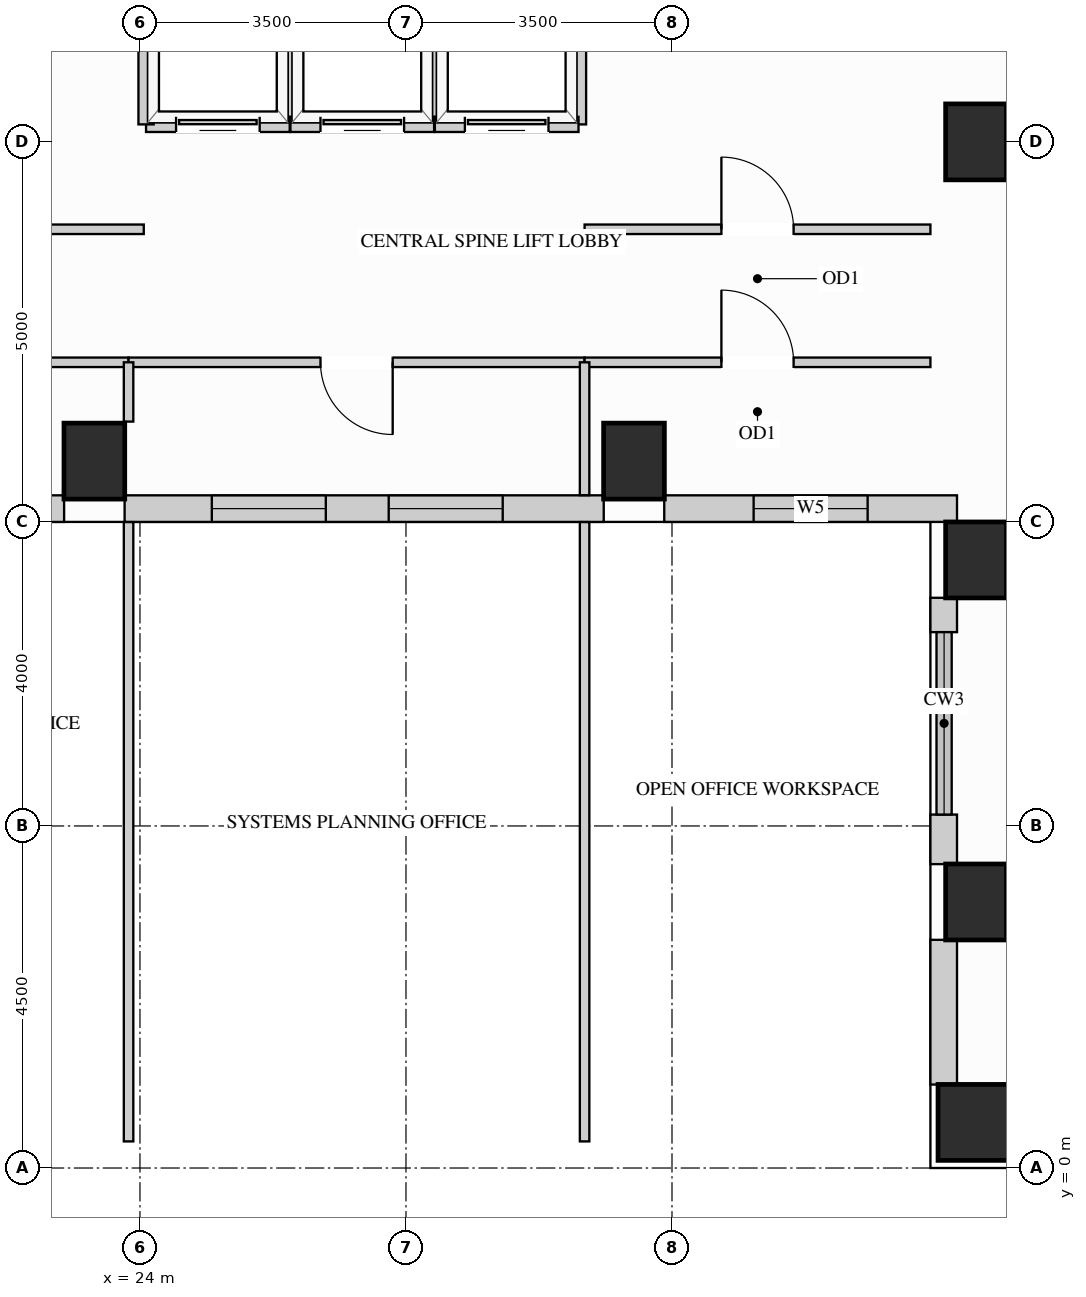
"""IFC4 building model, lengths in metres.
Left out: names, types, materials, properties, quantities, classifications, styles, units other than length and angle.
Written with IfcOpenShell. Run it as: python <this file> out.ifc"""

import sys

from ifc_helpers import new_model, si_unit, direction, frame, frame_2d, origin, origin_2d, place, context, subcontext, project, spatial, rectangle, extrude, source, transform, mapped, element, fill, save


model = new_model("IFC4")
c1 = context("Model", 3, precision=1e-05, world=origin(), true_north=direction((0.0, 1.0)))
c2 = subcontext(c1, "Body", "Model", "MODEL_VIEW")
j1 = project(units=[si_unit("LENGTHUNIT", "METRE"), si_unit("PLANEANGLEUNIT", "RADIAN")], contexts=[c1])
p1 = place(None, origin())
s1 = spatial("IfcSite", under=j1, at=p1, CompositionType="ELEMENT")
p2 = place(p1, origin())
s2 = spatial("IfcBuilding", under=s1, at=p2, CompositionType="ELEMENT")
p3 = place(p2, frame((0.0, 0.0, 189.9)))
s3 = spatial("IfcBuildingStorey", under=s2, at=p3, CompositionType="ELEMENT", Elevation=189.9)
m1 = source(origin(), c2, "Body", "SweptSolid", [
    extrude(rectangle(XDim=0.8, YDim=1.0, at=origin_2d()), origin(), (0.0, 0.0, 1.0), 3.4),
])
for number, where, z_axis, x_axis in (
    (1, (35.0, 13.5, 0.0), (0.0, 0.0, 1.0), (1.0, 0.0, 0.0)),
    (2, (35.0, 3.5, 0.0), (0.0, 0.0, 1.0), (1.0, 0.0, 0.0)),
    (3, (35.0, 8.0, 0.0), (0.0, 0.0, 1.0), (1.0, 0.0, 0.0)),
    (4, (23.4, 9.3, 0.0), (0.0, 0.0, 1.0), (1.0, 0.0, 0.0)),
    (5, (30.5, 9.3, 0.0), (0.0, 0.0, 1.0), (1.0, 0.0, 0.0)),
):
    element("IfcColumn", number, at=place(p3, frame(where, z_axis=z_axis, x_axis=x_axis)), inside=s3, PredefinedType="COLUMN", context=c2, shape_type="MappedRepresentation", body=[
        mapped(m1, transform((0.0, 0.0, 0.0), x_axis=(1.0, 0.0, 0.0), y_axis=(0.0, 1.0, 0.0), z_axis=(0.0, 0.0, 1.0))),
    ])
m2 = source(origin(), c2, "Body", "SweptSolid", [
    extrude(rectangle(XDim=1.0, YDim=1.0, at=origin_2d()), origin(), (0.0, 0.0, 1.0), 3.4),
])
p4 = place(p3, frame((35.0, 0.6, 0.0), z_axis=(0.0, 0.0, 1.0), x_axis=(1.0, 0.0, 0.0)))
e6 = element("IfcColumn", 6, at=p4, inside=s3, PredefinedType="COLUMN", context=c2, shape_type="MappedRepresentation", body=[
    mapped(m2, transform((0.0, 0.0, 0.0), x_axis=(1.0, 0.0, 0.0), y_axis=(0.0, 1.0, 0.0), z_axis=(0.0, 0.0, 1.0))),
])
p5 = place(p3, frame((19.398, 8.675, 0.0), z_axis=(0.0, 0.0, 1.0), x_axis=(1.0, 0.0, 0.0)))
e7 = element("IfcWall", 7, at=p5, inside=s3, PredefinedType="SOLIDWALL", context=c2, shape_type="SweptSolid", body=[
    extrude(rectangle(XDim=3.604, YDim=0.35, at=frame_2d((1.802, 0.0))), origin(), (0.0, 0.0, 1.0), 3.385),
])
p6 = place(p5, frame((1.067, 0.0, 0.78)))
e8 = element("IfcOpeningElement", 8, at=p6, cuts=e7, PredefinedType="OPENING", context=c2, shape_type="SweptSolid", body=[
    extrude(rectangle(XDim=1.5, YDim=2.0, at=frame_2d((0.75, 1.0))), frame((0.0, 0.185, 0.0), z_axis=(0.0, -1.0, 0.0), x_axis=(1.0, 0.0, 0.0)), (0.0, 0.0, 1.0), 0.37),
])
p7 = place(p3, frame((23.798, 8.675, 0.0), z_axis=(0.0, 0.0, 1.0), x_axis=(1.0, 0.0, 0.0)))
e9 = element("IfcWall", 9, at=p7, inside=s3, PredefinedType="SOLIDWALL", context=c2, shape_type="SweptSolid", body=[
    extrude(rectangle(XDim=6.304, YDim=0.35, at=frame_2d((3.152, 0.0))), origin(), (0.0, 0.0, 1.0), 3.385),
])
p8 = place(p7, frame((1.147, 0.0, 0.78)))
e10 = element("IfcOpeningElement", 10, at=p8, cuts=e9, PredefinedType="OPENING", context=c2, shape_type="SweptSolid", body=[
    extrude(rectangle(XDim=1.5, YDim=2.0, at=frame_2d((0.75, 1.0))), frame((0.0, 0.185, 0.0), z_axis=(0.0, -1.0, 0.0), x_axis=(1.0, 0.0, 0.0)), (0.0, 0.0, 1.0), 0.37),
])
p9 = place(p7, frame((3.475, 0.0, 0.78)))
e11 = element("IfcOpeningElement", 11, at=p9, cuts=e9, PredefinedType="OPENING", context=c2, shape_type="SweptSolid", body=[
    extrude(rectangle(XDim=1.5, YDim=2.0, at=frame_2d((0.75, 1.0))), frame((0.0, 0.185, 0.0), z_axis=(0.0, -1.0, 0.0), x_axis=(1.0, 0.0, 0.0)), (0.0, 0.0, 1.0), 0.37),
])
p10 = place(p3, frame((30.898, 8.675, 0.0), z_axis=(0.0, 0.0, 1.0), x_axis=(1.0, 0.0, 0.0)))
e12 = element("IfcWall", 12, at=p10, inside=s3, PredefinedType="SOLIDWALL", context=c2, shape_type="SweptSolid", body=[
    extrude(rectangle(XDim=3.852, YDim=0.35, at=frame_2d((1.926, 0.0))), origin(), (0.0, 0.0, 1.0), 3.385),
])
p11 = place(p10, frame((1.176, 0.0, 0.78)))
e13 = element("IfcOpeningElement", 13, at=p11, cuts=e12, PredefinedType="OPENING", context=c2, shape_type="SweptSolid", body=[
    extrude(rectangle(XDim=1.5, YDim=2.0, at=frame_2d((0.75, 1.0))), frame((0.0, 0.185, 0.0), z_axis=(0.0, -1.0, 0.0), x_axis=(1.0, 0.0, 0.0)), (0.0, 0.0, 1.0), 0.37),
])
m3 = source(origin(), c2, "Body", "SweptSolid", [
    extrude(rectangle(XDim=0.452, YDim=0.35, at=frame_2d((0.226, 0.0))), origin(), (0.0, 0.0, 1.0), 2.612),
])
p12 = place(p3, frame((34.575, 7.502, 0.0), z_axis=(0.0, 0.0, 1.0), x_axis=(0.0, -1.0, 0.0)))
e14 = element("IfcWall", 14, at=p12, inside=s3, PredefinedType="SOLIDWALL", context=c2, shape_type="MappedRepresentation", body=[
    mapped(m3, transform((0.0, 0.0, 0.0), x_axis=(1.0, 0.0, 0.0), y_axis=(0.0, 1.0, 0.0), z_axis=(0.0, 0.0, 1.0))),
])
m4 = source(origin(), c2, "Body", "SweptSolid", [
    extrude(rectangle(XDim=0.652, YDim=0.35, at=frame_2d((0.326, 0.0))), origin(), (0.0, 0.0, 1.0), 2.612),
])
p13 = place(p3, frame((34.575, 4.65, 0.0), z_axis=(0.0, 0.0, 1.0), x_axis=(0.0, -1.0, 0.0)))
e15 = element("IfcWall", 15, at=p13, inside=s3, PredefinedType="SOLIDWALL", context=c2, shape_type="MappedRepresentation", body=[
    mapped(m4, transform((0.0, 0.0, 0.0), x_axis=(1.0, 0.0, 0.0), y_axis=(0.0, 1.0, 0.0), z_axis=(0.0, 0.0, 1.0))),
])
m5 = source(origin(), c2, "Body", "SweptSolid", [
    extrude(rectangle(XDim=1.904, YDim=0.35, at=frame_2d((0.952, 0.0))), origin(), (0.0, 0.0, 1.0), 2.612),
])
p14 = place(p3, frame((34.575, 3.002, 0.0), z_axis=(0.0, 0.0, 1.0), x_axis=(0.0, -1.0, 0.0)))
e16 = element("IfcWall", 16, at=p14, inside=s3, PredefinedType="SOLIDWALL", context=c2, shape_type="MappedRepresentation", body=[
    mapped(m5, transform((0.0, 0.0, 0.0), x_axis=(1.0, 0.0, 0.0), y_axis=(0.0, 1.0, 0.0), z_axis=(0.0, 0.0, 1.0))),
])
p15 = place(p3, frame((29.85, 12.35, 0.0), z_axis=(0.0, 0.0, 1.0), x_axis=(1.0, 0.0, 0.0)))
e17 = element("IfcWall", 17, at=p15, inside=s3, PredefinedType="PARTITIONING", context=c2, shape_type="SweptSolid", body=[
    extrude(rectangle(XDim=4.55, YDim=0.125, at=frame_2d((2.275, 0.0))), origin(), (0.0, 0.0, 1.0), 3.385),
])
p16 = place(p15, frame((1.8, 0.0, 0.0)))
e18 = element("IfcOpeningElement", 18, at=p16, cuts=e17, PredefinedType="OPENING", context=c2, shape_type="SweptSolid", body=[
    extrude(rectangle(XDim=0.95, YDim=2.15, at=frame_2d((0.475, 1.075))), frame((0.0, 0.073, 0.0), z_axis=(0.0, -1.0, 0.0), x_axis=(1.0, 0.0, 0.0)), (0.0, 0.0, 1.0), 0.145),
])
p17 = place(p3, frame((19.5, 12.35, 0.0), z_axis=(0.0, 0.0, 1.0), x_axis=(1.0, 0.0, 0.0)))
e19 = element("IfcWall", 19, at=p17, inside=s3, PredefinedType="PARTITIONING", context=c2, shape_type="SweptSolid", body=[
    extrude(rectangle(XDim=4.55, YDim=0.125, at=frame_2d((2.275, 0.0))), origin(), (0.0, 0.0, 1.0), 3.385),
])
p18 = place(p17, frame((1.8, 0.0, 0.0)))
e20 = element("IfcOpeningElement", 20, at=p18, cuts=e19, PredefinedType="OPENING", context=c2, shape_type="SweptSolid", body=[
    extrude(rectangle(XDim=0.95, YDim=2.15, at=frame_2d((0.475, 1.075))), frame((0.0, 0.073, 0.0), z_axis=(0.0, -1.0, 0.0), x_axis=(1.0, 0.0, 0.0)), (0.0, 0.0, 1.0), 0.145),
])
p19 = place(p3, frame((19.5, 10.6, 0.0), z_axis=(0.0, 0.0, 1.0), x_axis=(1.0, 0.0, 0.0)))
e21 = element("IfcWall", 21, at=p19, inside=s3, PredefinedType="PARTITIONING", context=c2, shape_type="SweptSolid", body=[
    extrude(rectangle(XDim=4.35, YDim=0.125, at=frame_2d((2.175, 0.0))), origin(), (0.0, 0.0, 1.0), 3.385),
])
p20 = place(p19, frame((1.7, 0.0, 0.0)))
e22 = element("IfcOpeningElement", 22, at=p20, cuts=e21, PredefinedType="OPENING", context=c2, shape_type="SweptSolid", body=[
    extrude(rectangle(XDim=0.95, YDim=2.15, at=frame_2d((0.475, 1.075))), frame((0.0, 0.073, 0.0), z_axis=(0.0, -1.0, 0.0), x_axis=(1.0, 0.0, 0.0)), (0.0, 0.0, 1.0), 0.145),
])
p21 = place(p3, frame((23.85, 10.6, 0.0), z_axis=(0.0, 0.0, 1.0), x_axis=(1.0, 0.0, 0.0)))
e23 = element("IfcWall", 23, at=p21, inside=s3, PredefinedType="PARTITIONING", context=c2, shape_type="SweptSolid", body=[
    extrude(rectangle(XDim=6.0, YDim=0.125, at=frame_2d((3.0, 0.0))), origin(), (0.0, 0.0, 1.0), 3.385),
])
p22 = place(p21, frame((2.525, 0.0, 0.0)))
e24 = element("IfcOpeningElement", 24, at=p22, cuts=e23, PredefinedType="OPENING", context=c2, shape_type="SweptSolid", body=[
    extrude(rectangle(XDim=0.95, YDim=2.15, at=frame_2d((0.475, 1.075))), frame((0.0, 0.073, 0.0), z_axis=(0.0, -1.0, 0.0), x_axis=(1.0, 0.0, 0.0)), (0.0, 0.0, 1.0), 0.145),
])
p23 = place(p3, frame((29.85, 10.6, 0.0), z_axis=(0.0, 0.0, 1.0), x_axis=(1.0, 0.0, 0.0)))
e25 = element("IfcWall", 25, at=p23, inside=s3, PredefinedType="PARTITIONING", context=c2, shape_type="SweptSolid", body=[
    extrude(rectangle(XDim=4.55, YDim=0.125, at=frame_2d((2.275, 0.0))), origin(), (0.0, 0.0, 1.0), 3.385),
])
p24 = place(p23, frame((1.8, 0.0, 0.0)))
e26 = element("IfcOpeningElement", 26, at=p24, cuts=e25, PredefinedType="OPENING", context=c2, shape_type="SweptSolid", body=[
    extrude(rectangle(XDim=0.95, YDim=2.15, at=frame_2d((0.475, 1.075))), frame((0.0, 0.073, 0.0), z_axis=(0.0, -1.0, 0.0), x_axis=(1.0, 0.0, 0.0)), (0.0, 0.0, 1.0), 0.145),
])
m6 = source(origin(), c2, "Body", "SweptSolid", [
    extrude(rectangle(XDim=8.148, YDim=0.125, at=frame_2d((4.074, 0.0))), origin(), (0.0, 0.0, 1.0), 3.385),
])
p25 = place(p3, frame((23.85, 0.35, 0.0), z_axis=(0.0, 0.0, 1.0), x_axis=(0.0, 1.0, 0.0)))
e27 = element("IfcWall", 27, at=p25, inside=s3, PredefinedType="PARTITIONING", context=c2, shape_type="MappedRepresentation", body=[
    mapped(m6, transform((0.0, 0.0, 0.0), x_axis=(1.0, 0.0, 0.0), y_axis=(0.0, 1.0, 0.0), z_axis=(0.0, 0.0, 1.0))),
])
m7 = source(origin(), c2, "Body", "SweptSolid", [
    extrude(rectangle(XDim=0.78, YDim=0.125, at=frame_2d((0.39, 0.0))), origin(), (0.0, 0.0, 1.0), 3.385),
])
p26 = place(p3, frame((23.85, 9.82, 0.0), z_axis=(0.0, 0.0, 1.0), x_axis=(0.0, 1.0, 0.0)))
e28 = element("IfcWall", 28, at=p26, inside=s3, PredefinedType="PARTITIONING", context=c2, shape_type="MappedRepresentation", body=[
    mapped(m7, transform((0.0, 0.0, 0.0), x_axis=(1.0, 0.0, 0.0), y_axis=(0.0, 1.0, 0.0), z_axis=(0.0, 0.0, 1.0))),
])
p27 = place(p3, frame((29.85, 0.35, 0.0), z_axis=(0.0, 0.0, 1.0), x_axis=(0.0, 1.0, 0.0)))
e29 = element("IfcWall", 29, at=p27, inside=s3, PredefinedType="PARTITIONING", context=c2, shape_type="MappedRepresentation", body=[
    mapped(m6, transform((0.0, 0.0, 0.0), x_axis=(1.0, 0.0, 0.0), y_axis=(0.0, 1.0, 0.0), z_axis=(0.0, 0.0, 1.0))),
])
m8 = source(origin(), c2, "Body", "SweptSolid", [
    extrude(rectangle(XDim=1.748, YDim=0.125, at=frame_2d((0.874, 0.0))), origin(), (0.0, 0.0, 1.0), 3.385),
])
p28 = place(p3, frame((29.85, 8.852, 0.0), z_axis=(0.0, 0.0, 1.0), x_axis=(0.0, 1.0, 0.0)))
e30 = element("IfcWall", 30, at=p28, inside=s3, PredefinedType="PARTITIONING", context=c2, shape_type="MappedRepresentation", body=[
    mapped(m8, transform((0.0, 0.0, 0.0), x_axis=(1.0, 0.0, 0.0), y_axis=(0.0, 1.0, 0.0), z_axis=(0.0, 0.0, 1.0))),
])
m9 = source(origin(), c2, "Body", "SweptSolid", [
    extrude(rectangle(XDim=2.29, YDim=0.2, at=frame_2d((1.145, 0.0))), origin(), (0.0, 0.0, 1.0), 3.385),
])
p29 = place(p3, frame((25.97, 13.73, 0.0), z_axis=(0.0, 0.0, 1.0), x_axis=(0.0, 1.0, 0.0)))
e31 = element("IfcWall", 31, at=p29, inside=s3, PredefinedType="PARTITIONING", context=c2, shape_type="MappedRepresentation", body=[
    mapped(m9, transform((0.0, 0.0, 0.0), x_axis=(1.0, 0.0, 0.0), y_axis=(0.0, 1.0, 0.0), z_axis=(0.0, 0.0, 1.0))),
])
p30 = place(p3, frame((24.08, 13.73, 0.0), z_axis=(0.0, 0.0, 1.0), x_axis=(1.0, 0.0, 0.0)))
e32 = element("IfcWall", 32, at=p30, inside=s3, PredefinedType="PARTITIONING", context=c2, shape_type="SweptSolid", body=[
    extrude(rectangle(XDim=1.89, YDim=0.2, at=frame_2d((0.945, 0.0))), origin(), (0.0, 0.0, 1.0), 2.466),
])
p31 = place(p30, frame((0.395, 0.0, 0.0)))
e33 = element("IfcOpeningElement", 33, at=p31, cuts=e32, PredefinedType="OPENING", context=c2, shape_type="SweptSolid", body=[
    extrude(rectangle(XDim=1.1, YDim=2.2, at=frame_2d((0.55, 1.1))), frame((0.0, 0.11, 0.0), z_axis=(0.0, -1.0, 0.0), x_axis=(1.0, 0.0, 0.0)), (0.0, 0.0, 1.0), 0.22),
])
for number, where, z_axis, x_axis in (
    (34, (24.08, 13.73, 0.0), (0.0, 0.0, 1.0), (0.0, 1.0, 0.0)),
    (35, (27.87, 13.73, 0.0), (0.0, 0.0, 1.0), (0.0, 1.0, 0.0)),
):
    element("IfcWall", number, at=place(p3, frame(where, z_axis=z_axis, x_axis=x_axis)), inside=s3, PredefinedType="PARTITIONING", context=c2, shape_type="MappedRepresentation", body=[
        mapped(m9, transform((0.0, 0.0, 0.0), x_axis=(1.0, 0.0, 0.0), y_axis=(0.0, 1.0, 0.0), z_axis=(0.0, 0.0, 1.0))),
    ])
p32 = place(p3, frame((25.98, 13.73, 0.0), z_axis=(0.0, 0.0, 1.0), x_axis=(1.0, 0.0, 0.0)))
e36 = element("IfcWall", 36, at=p32, inside=s3, PredefinedType="PARTITIONING", context=c2, shape_type="SweptSolid", body=[
    extrude(rectangle(XDim=1.89, YDim=0.2, at=frame_2d((0.945, 0.0))), origin(), (0.0, 0.0, 1.0), 2.466),
])
p33 = place(p32, frame((0.395, 0.0, 0.0)))
e37 = element("IfcOpeningElement", 37, at=p33, cuts=e36, PredefinedType="OPENING", context=c2, shape_type="SweptSolid", body=[
    extrude(rectangle(XDim=1.1, YDim=2.2, at=frame_2d((0.55, 1.1))), frame((0.0, 0.11, 0.0), z_axis=(0.0, -1.0, 0.0), x_axis=(1.0, 0.0, 0.0)), (0.0, 0.0, 1.0), 0.22),
])
p34 = place(p3, frame((29.77, 13.73, 0.0), z_axis=(0.0, 0.0, 1.0), x_axis=(0.0, 1.0, 0.0)))
e38 = element("IfcWall", 38, at=p34, inside=s3, PredefinedType="PARTITIONING", context=c2, shape_type="MappedRepresentation", body=[
    mapped(m9, transform((0.0, 0.0, 0.0), x_axis=(1.0, 0.0, 0.0), y_axis=(0.0, 1.0, 0.0), z_axis=(0.0, 0.0, 1.0))),
])
p35 = place(p3, frame((27.88, 13.73, 0.0), z_axis=(0.0, 0.0, 1.0), x_axis=(1.0, 0.0, 0.0)))
e39 = element("IfcWall", 39, at=p35, inside=s3, PredefinedType="PARTITIONING", context=c2, shape_type="SweptSolid", body=[
    extrude(rectangle(XDim=1.89, YDim=0.2, at=frame_2d((0.945, 0.0))), origin(), (0.0, 0.0, 1.0), 2.466),
])
p36 = place(p35, frame((0.395, 0.0, 0.0)))
e40 = element("IfcOpeningElement", 40, at=p36, cuts=e39, PredefinedType="OPENING", context=c2, shape_type="SweptSolid", body=[
    extrude(rectangle(XDim=1.1, YDim=2.2, at=frame_2d((0.55, 1.1))), frame((0.0, 0.11, 0.0), z_axis=(0.0, -1.0, 0.0), x_axis=(1.0, 0.0, 0.0)), (0.0, 0.0, 1.0), 0.22),
])
m10 = source(origin(), c2, "Body", "SweptSolid", [
    extrude(rectangle(XDim=1.1, YDim=2.2, at=frame_2d((0.55, 1.1))), frame((0.0, 0.025, 0.0), z_axis=(0.0, -1.0, 0.0), x_axis=(1.0, 0.0, 0.0)), (0.0, 0.0, 1.0), 0.05),
])
p37 = place(p31, origin())
e41 = element("IfcDoor", 41, at=p37, inside=s3, OperationType="SLIDING_TO_LEFT", PredefinedType="DOOR", context=c2, shape_type="MappedRepresentation", body=[
    mapped(m10, transform((0.0, 0.0, 0.0), x_axis=(1.0, 0.0, 0.0), y_axis=(0.0, 1.0, 0.0), z_axis=(0.0, 0.0, 1.0))),
])
fill(e33, e41)
p38 = place(p33, origin())
e42 = element("IfcDoor", 42, at=p38, inside=s3, OperationType="SLIDING_TO_LEFT", PredefinedType="DOOR", context=c2, shape_type="MappedRepresentation", body=[
    mapped(m10, transform((0.0, 0.0, 0.0), x_axis=(1.0, 0.0, 0.0), y_axis=(0.0, 1.0, 0.0), z_axis=(0.0, 0.0, 1.0))),
])
fill(e37, e42)
p39 = place(p36, origin())
e43 = element("IfcDoor", 43, at=p39, inside=s3, OperationType="SLIDING_TO_LEFT", PredefinedType="DOOR", context=c2, shape_type="MappedRepresentation", body=[
    mapped(m10, transform((0.0, 0.0, 0.0), x_axis=(1.0, 0.0, 0.0), y_axis=(0.0, 1.0, 0.0), z_axis=(0.0, 0.0, 1.0))),
])
fill(e40, e43)
m11 = source(origin(), c2, "Body", "SweptSolid", [
    extrude(rectangle(XDim=0.95, YDim=2.15, at=frame_2d((0.475, 1.075))), frame((0.0, 0.025, 0.0), z_axis=(0.0, -1.0, 0.0), x_axis=(1.0, 0.0, 0.0)), (0.0, 0.0, 1.0), 0.05),
])
p40 = place(p16, origin())
e44 = element("IfcDoor", 44, at=p40, inside=s3, OperationType="SINGLE_SWING_LEFT", PredefinedType="DOOR", context=c2, shape_type="MappedRepresentation", body=[
    mapped(m11, transform((0.0, 0.0, 0.0), x_axis=(1.0, 0.0, 0.0), y_axis=(0.0, 1.0, 0.0), z_axis=(0.0, 0.0, 1.0))),
])
fill(e18, e44)
p41 = place(p22, origin())
e45 = element("IfcDoor", 45, at=p41, inside=s3, OperationType="SINGLE_SWING_RIGHT", PredefinedType="DOOR", context=c2, shape_type="MappedRepresentation", body=[
    mapped(m11, transform((0.0, 0.0, 0.0), x_axis=(1.0, 0.0, 0.0), y_axis=(0.0, 1.0, 0.0), z_axis=(0.0, 0.0, 1.0))),
])
fill(e24, e45)
p42 = place(p24, origin())
e46 = element("IfcDoor", 46, at=p42, inside=s3, OperationType="SINGLE_SWING_LEFT", PredefinedType="DOOR", context=c2, shape_type="MappedRepresentation", body=[
    mapped(m11, transform((0.0, 0.0, 0.0), x_axis=(1.0, 0.0, 0.0), y_axis=(0.0, 1.0, 0.0), z_axis=(0.0, 0.0, 1.0))),
])
fill(e26, e46)
m12 = source(origin(), c2, "Body", "SweptSolid", [
    extrude(rectangle(XDim=1.5, YDim=2.0, at=frame_2d((0.75, 1.0))), frame((0.0, 0.03, 0.0), z_axis=(0.0, -1.0, 0.0), x_axis=(1.0, 0.0, 0.0)), (0.0, 0.0, 1.0), 0.06),
])
p43 = place(p8, origin())
e47 = element("IfcWindow", 47, at=p43, inside=s3, PartitioningType="SINGLE_PANEL", PredefinedType="WINDOW", context=c2, shape_type="MappedRepresentation", body=[
    mapped(m12, transform((0.0, 0.0, 0.0), x_axis=(1.0, 0.0, 0.0), y_axis=(0.0, 1.0, 0.0), z_axis=(0.0, 0.0, 1.0))),
])
fill(e10, e47)
p44 = place(p9, origin())
e48 = element("IfcWindow", 48, at=p44, inside=s3, PartitioningType="SINGLE_PANEL", PredefinedType="WINDOW", context=c2, shape_type="MappedRepresentation", body=[
    mapped(m12, transform((0.0, 0.0, 0.0), x_axis=(1.0, 0.0, 0.0), y_axis=(0.0, 1.0, 0.0), z_axis=(0.0, 0.0, 1.0))),
])
fill(e11, e48)
p45 = place(p11, origin())
e49 = element("IfcWindow", 49, at=p45, inside=s3, PartitioningType="SINGLE_PANEL", PredefinedType="WINDOW", context=c2, shape_type="MappedRepresentation", body=[
    mapped(m12, transform((0.0, 0.0, 0.0), x_axis=(1.0, 0.0, 0.0), y_axis=(0.0, 1.0, 0.0), z_axis=(0.0, 0.0, 1.0))),
])
fill(e13, e49)
save(model, sys.argv[1])
